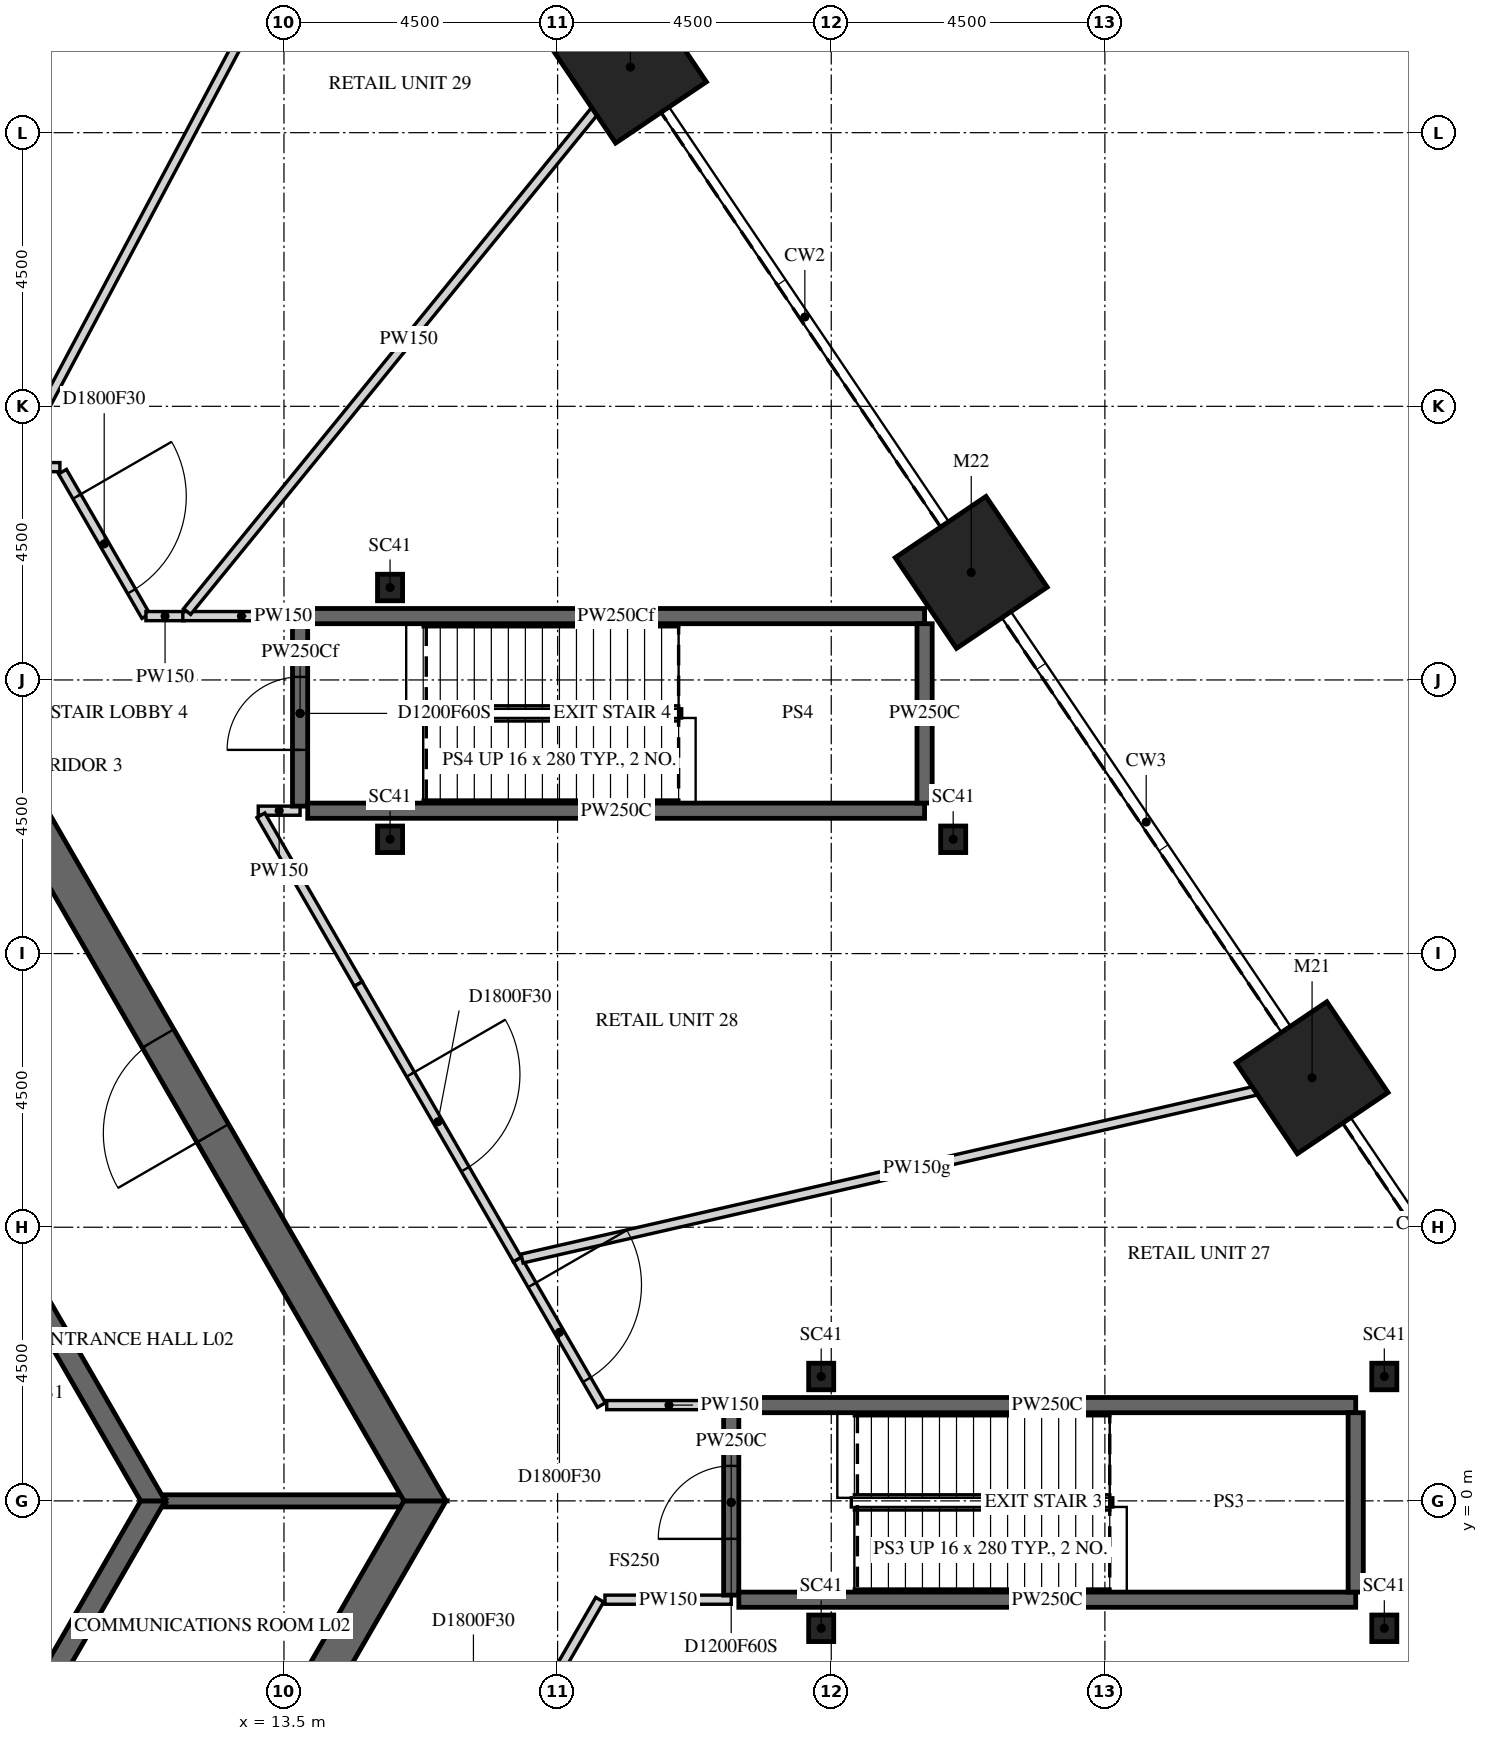
"""IFC4 building model, lengths in metres.
Left out: names, types, materials, properties, quantities, classifications, styles, units other than length and angle.
Written with IfcOpenShell. Run it as: python <this file> out.ifc"""

import sys

from ifc_helpers import new_model, si_unit, direction, frame, frame_2d, origin, origin_2d, place, context, subcontext, project, spatial, polyline, rectangle, i_section, outline, extrude, element, fill, save


model = new_model("IFC4")
c1 = context("Model", 3, precision=1e-05, world=origin(), true_north=direction((0.0, 1.0)))
c2 = subcontext(c1, "Body", "Model", "MODEL_VIEW")
j1 = project(units=[si_unit("LENGTHUNIT", "METRE"), si_unit("PLANEANGLEUNIT", "RADIAN")], contexts=[c1])
p1 = place(None, origin())
s1 = spatial("IfcSite", under=j1, at=p1, CompositionType="ELEMENT")
p2 = place(p1, origin())
s2 = spatial("IfcBuilding", under=s1, at=p2, CompositionType="ELEMENT")
p3 = place(p2, frame((0.0, 0.0, 15.0)))
s3 = spatial("IfcBuildingStorey", under=s2, at=p3, CompositionType="ELEMENT", Elevation=15.0)
for number, where, z_axis, x_axis in (
    (1, (30.407, 6.958, -0.25), (0.0, 0.0, 1.0), (0.559, -0.829, 0.0)),
    (2, (24.802, 15.269, -0.25), (0.0, 0.0, 1.0), (0.559, -0.829, 0.0)),
    (3, (19.197, 23.579, -0.25), (0.0, 0.0, 1.0), (0.559, -0.829, 0.0)),
):
    element("IfcColumn", number, at=place(p3, frame(where, z_axis=z_axis, x_axis=x_axis)), inside=s3, PredefinedType="COLUMN", context=c2, shape_type="SweptSolid", body=[
        extrude(rectangle(XDim=1.8, YDim=1.8, at=origin_2d()), origin(), (0.0, 0.0, 1.0), 5.5),
    ])
for number, where, z_axis, x_axis in (
    (4, (31.595, 2.045, -0.25), (0.0, 0.0, 1.0), (1.0, 0.0, 0.0)),
    (5, (31.595, -2.095, -0.25), (0.0, 0.0, 1.0), (1.0, 0.0, 0.0)),
    (6, (22.335, -2.095, -0.25), (0.0, 0.0, 1.0), (1.0, 0.0, 0.0)),
    (7, (22.335, 2.045, -0.25), (0.0, 0.0, 1.0), (1.0, 0.0, 0.0)),
    (8, (24.505, 10.88, -0.25), (0.0, 0.0, 1.0), (1.0, 0.0, 0.0)),
    (9, (15.245, 10.88, -0.25), (0.0, 0.0, 1.0), (1.0, 0.0, 0.0)),
    (10, (15.245, 15.02, -0.25), (0.0, 0.0, 1.0), (1.0, 0.0, 0.0)),
):
    element("IfcColumn", number, at=place(p3, frame(where, z_axis=z_axis, x_axis=x_axis)), inside=s3, PredefinedType="COLUMN", context=c2, shape_type="SweptSolid", body=[
        extrude(i_section(OverallWidth=0.412, OverallDepth=0.437, WebThickness=0.036, FlangeThickness=0.058, FilletRadius=0.015, at=origin_2d()), origin(), (0.0, 0.0, 1.0), 5.5),
    ])
p4 = place(p3, frame((7.91, -13.7, -0.25), z_axis=(0.0, 0.0, 1.0), x_axis=(0.499999880136, 0.866025472988, 0.0)))
e11 = element("IfcWall", 11, at=p4, inside=s3, PredefinedType="SHEAR", context=c2, shape_type="SweptSolid", body=[
    extrude(outline(polyline([(-0.173, -0.3), (15.993, -0.3), (15.646, 0.3), (0.173, 0.3), (-0.173, -0.3)])), origin(), (0.0, 0.0, 1.0), 5.5),
])
p5 = place(p4, frame((7.039, 0.0, 0.25)))
e12 = element("IfcOpeningElement", 12, at=p5, cuts=e11, PredefinedType="OPENING", context=c2, shape_type="SweptSolid", body=[
    extrude(rectangle(XDim=1.8, YDim=2.4, at=frame_2d((0.9, 1.2))), frame((0.0, 0.31, 0.0), z_axis=(0.0, -1.0, 0.0), x_axis=(1.0, 0.0, 0.0)), (0.0, 0.0, 1.0), 0.62),
])
p6 = place(p3, frame((15.819, 0.0, -0.25), z_axis=(0.0, 0.0, 1.0), x_axis=(-0.499999880136, 0.866025472988, 0.0)))
e13 = element("IfcWall", 13, at=p6, inside=s3, PredefinedType="SHEAR", context=c2, shape_type="SweptSolid", body=[
    extrude(outline(polyline([(-0.173, -0.3), (15.993, -0.3), (15.646, 0.3), (0.173, 0.3), (-0.173, -0.3)])), origin(), (0.0, 0.0, 1.0), 5.5),
])
p7 = place(p6, frame((6.981, 0.0, 0.25)))
e14 = element("IfcOpeningElement", 14, at=p7, cuts=e13, PredefinedType="OPENING", context=c2, shape_type="SweptSolid", body=[
    extrude(rectangle(XDim=1.8, YDim=2.4, at=frame_2d((0.9, 1.2))), frame((0.0, 0.31, 0.0), z_axis=(0.0, -1.0, 0.0), x_axis=(1.0, 0.0, 0.0)), (0.0, 0.0, 1.0), 0.62),
])
p8 = place(p3, frame((5.673, -9.825, -0.25), z_axis=(0.0, 0.0, 1.0), x_axis=(0.499995046907, 0.866028263435, 0.0)))
e15 = element("IfcWall", 15, at=p8, inside=s3, PredefinedType="SHEAR", context=c2, shape_type="SweptSolid", body=[
    extrude(outline(polyline([(-0.101, -0.175), (11.446, -0.175), (11.244, 0.175), (0.101, 0.175), (-0.101, -0.175)])), origin(), (0.0, 0.0, 1.0), 5.5),
])
p9 = place(p8, frame((4.801, 0.0, 0.25)))
e16 = element("IfcOpeningElement", 16, at=p9, cuts=e15, PredefinedType="OPENING", context=c2, shape_type="SweptSolid", body=[
    extrude(rectangle(XDim=1.8, YDim=2.4, at=frame_2d((0.9, 1.2))), frame((0.0, 0.185, 0.0), z_axis=(0.0, -1.0, 0.0), x_axis=(1.0, 0.0, 0.0)), (0.0, 0.0, 1.0), 0.37),
])
p10 = place(p3, frame((11.345, 0.0, -0.25), z_axis=(0.0, 0.0, 1.0), x_axis=(-0.499995046907, 0.866028263435, 0.0)))
e17 = element("IfcWall", 17, at=p10, inside=s3, PredefinedType="SHEAR", context=c2, shape_type="SweptSolid", body=[
    extrude(outline(polyline([(-0.101, -0.175), (11.446, -0.175), (11.244, 0.175), (0.101, 0.175), (-0.101, -0.175)])), origin(), (0.0, 0.0, 1.0), 5.5),
])
p11 = place(p10, frame((4.744, 0.0, 0.25)))
e18 = element("IfcOpeningElement", 18, at=p11, cuts=e17, PredefinedType="OPENING", context=c2, shape_type="SweptSolid", body=[
    extrude(rectangle(XDim=1.8, YDim=2.4, at=frame_2d((0.9, 1.2))), frame((0.0, 0.185, 0.0), z_axis=(0.0, -1.0, 0.0), x_axis=(1.0, 0.0, 0.0)), (0.0, 0.0, 1.0), 0.37),
])
p12 = place(p3, frame((11.547, 0.0, -0.25), z_axis=(0.0, 0.0, 1.0), x_axis=(1.0, 0.0, 0.0)))
e19 = element("IfcWall", 19, at=p12, inside=s3, PredefinedType="SHEAR", context=c2, shape_type="SweptSolid", body=[
    extrude(rectangle(XDim=3.926, YDim=0.2, at=frame_2d((1.963, 0.0))), origin(), (0.0, 0.0, 1.0), 5.5),
])
p13 = place(p3, frame((9.815, 17.0, 0.0), z_axis=(0.0, 0.0, 1.0), x_axis=(-1.0, 0.0, 0.0)))
e20 = element("IfcWall", 20, at=p13, inside=s3, PredefinedType="PARTITIONING", context=c2, shape_type="SweptSolid", body=[
    extrude(rectangle(XDim=0.776, YDim=0.15, at=frame_2d((0.388, 0.0))), origin(), (0.0, 0.0, 1.0), 5.25),
])
p14 = place(p3, frame((9.858, 16.925, 0.0), z_axis=(0.0, 0.0, 1.0), x_axis=(0.499835495421, -0.866120359718, 0.0)))
e21 = element("IfcWall", 21, at=p14, inside=s3, PredefinedType="PARTITIONING", context=c2, shape_type="SweptSolid", body=[
    extrude(rectangle(XDim=2.742, YDim=0.15, at=frame_2d((1.371, 0.0))), origin(), (0.0, 0.0, 1.0), 5.25),
])
p15 = place(p14, frame((0.471, 0.0, 0.0)))
e22 = element("IfcOpeningElement", 22, at=p15, cuts=e21, PredefinedType="OPENING", context=c2, shape_type="SweptSolid", body=[
    extrude(rectangle(XDim=1.8, YDim=2.1, at=frame_2d((0.9, 1.05))), frame((0.0, 0.085, 0.0), z_axis=(0.0, -1.0, 0.0), x_axis=(1.0, 0.0, 0.0)), (0.0, 0.0, 1.0), 0.17),
])
p16 = place(p3, frame((11.23, 14.55, 0.0), z_axis=(0.0, 0.0, 1.0), x_axis=(1.0, 0.0, 0.0)))
e23 = element("IfcWall", 23, at=p16, inside=s3, PredefinedType="PARTITIONING", context=c2, shape_type="SweptSolid", body=[
    extrude(rectangle(XDim=0.629, YDim=0.15, at=frame_2d((0.314, 0.0))), origin(), (0.0, 0.0, 1.0), 5.25),
])
p17 = place(p3, frame((11.836, 14.55, 0.0), z_axis=(0.0, 0.0, 1.0), x_axis=(1.0, 0.0, 0.0)))
e24 = element("IfcWall", 24, at=p17, inside=s3, PredefinedType="PARTITIONING", context=c2, shape_type="SweptSolid", body=[
    extrude(rectangle(XDim=1.929, YDim=0.15, at=frame_2d((0.964, 0.0))), origin(), (0.0, 0.0, 1.0), 5.25),
])
p18 = place(p3, frame((13.765, 11.35, 0.0), z_axis=(0.0, 0.0, 1.0), x_axis=(-1.0, 0.0, 0.0)))
e25 = element("IfcWall", 25, at=p18, inside=s3, PredefinedType="PARTITIONING", context=c2, shape_type="SweptSolid", body=[
    extrude(rectangle(XDim=0.688, YDim=0.15, at=frame_2d((0.344, 0.0))), origin(), (0.0, 0.0, 1.0), 5.25),
])
p19 = place(p3, frame((13.765, 11.425, 0.0), z_axis=(0.0, 0.0, 1.0), x_axis=(0.0, 1.0, 0.0)))
e26 = element("IfcWall", 26, at=p19, inside=s3, PredefinedType="PARTITIONING", context=c2, shape_type="SweptSolid", body=[
    extrude(rectangle(XDim=3.05, YDim=0.25, at=frame_2d((1.525, 0.0))), origin(), (0.0, 0.0, 1.0), 4.496),
])
p20 = place(p19, frame((0.925, 0.0, 0.0)))
e27 = element("IfcOpeningElement", 27, at=p20, cuts=e26, PredefinedType="OPENING", context=c2, shape_type="SweptSolid", body=[
    extrude(rectangle(XDim=1.2, YDim=2.1, at=frame_2d((0.6, 1.05))), frame((0.0, 0.135, 0.0), z_axis=(0.0, -1.0, 0.0), x_axis=(1.0, 0.0, 0.0)), (0.0, 0.0, 1.0), 0.27),
])
p21 = place(p3, frame((13.89, 14.55, 0.0), z_axis=(0.0, 0.0, 1.0), x_axis=(1.0, 0.0, 0.0)))
e28 = element("IfcWall", 28, at=p21, inside=s3, PredefinedType="PARTITIONING", context=c2, shape_type="SweptSolid", body=[
    extrude(rectangle(XDim=10.145, YDim=0.25, at=frame_2d((5.073, 0.0))), origin(), (0.0, 0.0, 1.0), 4.496),
])
p22 = place(p3, frame((14.723, 8.5, 0.0), z_axis=(0.0, 0.0, 1.0), x_axis=(-0.500104956678, 0.865964798538, 0.0)))
e29 = element("IfcWall", 29, at=p22, inside=s3, PredefinedType="PARTITIONING", context=c2, shape_type="SweptSolid", body=[
    extrude(rectangle(XDim=3.204, YDim=0.15, at=frame_2d((1.602, 0.0))), origin(), (0.0, 0.0, 1.0), 5.25),
])
p23 = place(p3, frame((15.261, 28.701, 0.0), z_axis=(0.0, 0.0, 1.0), x_axis=(-0.469500426527, -0.882932245131, 0.0)))
e30 = element("IfcWall", 30, at=p23, inside=s3, PredefinedType="PARTITIONING", context=c2, shape_type="SweptSolid", body=[
    extrude(rectangle(XDim=13.167, YDim=0.15, at=frame_2d((6.584, 0.0))), origin(), (0.0, 0.0, 1.0), 4.488),
])
p24 = place(p3, frame((14.723, 8.5, 0.0), z_axis=(0.0, 0.0, 1.0), x_axis=(0.499952654668, -0.866052736899, 0.0)))
e31 = element("IfcWall", 31, at=p24, inside=s3, PredefinedType="PARTITIONING", context=c2, shape_type="SweptSolid", body=[
    extrude(rectangle(XDim=5.233, YDim=0.15, at=frame_2d((2.616, 0.0))), origin(), (0.0, 0.0, 1.0), 5.25),
])
p25 = place(p24, frame((1.716, 0.0, 0.0)))
e32 = element("IfcOpeningElement", 32, at=p25, cuts=e31, PredefinedType="OPENING", context=c2, shape_type="SweptSolid", body=[
    extrude(rectangle(XDim=1.8, YDim=2.1, at=frame_2d((0.9, 1.05))), frame((0.0, 0.085, 0.0), z_axis=(0.0, -1.0, 0.0), x_axis=(1.0, 0.0, 0.0)), (0.0, 0.0, 1.0), 0.17),
])
p26 = place(p3, frame((18.004, -2.816, 0.0), z_axis=(0.0, 0.0, 1.0), x_axis=(0.500224363519, 0.865895828689, 0.0)))
e33 = element("IfcWall", 33, at=p26, inside=s3, PredefinedType="PARTITIONING", context=c2, shape_type="SweptSolid", body=[
    extrude(rectangle(XDim=1.375, YDim=0.15, at=frame_2d((0.688, 0.0))), origin(), (0.0, 0.0, 1.0), 5.25),
])
p27 = place(p3, frame((17.339, 3.968, 0.0), z_axis=(0.0, 0.0, 1.0), x_axis=(0.500053847239, -0.865994312834, 0.0)))
e34 = element("IfcWall", 34, at=p27, inside=s3, PredefinedType="PARTITIONING", context=c2, shape_type="SweptSolid", body=[
    extrude(rectangle(XDim=2.763, YDim=0.15, at=frame_2d((1.382, 0.0))), origin(), (0.0, 0.0, 1.0), 5.25),
])
p28 = place(p27, frame((0.482, 0.0, 0.0)))
e35 = element("IfcOpeningElement", 35, at=p28, cuts=e34, PredefinedType="OPENING", context=c2, shape_type="SweptSolid", body=[
    extrude(rectangle(XDim=1.8, YDim=2.1, at=frame_2d((0.9, 1.05))), frame((0.0, 0.085, 0.0), z_axis=(0.0, -1.0, 0.0), x_axis=(1.0, 0.0, 0.0)), (0.0, 0.0, 1.0), 0.17),
])
p29 = place(p3, frame((18.808, 1.575, 0.0), z_axis=(0.0, 0.0, 1.0), x_axis=(1.0, 0.0, 0.0)))
e36 = element("IfcWall", 36, at=p29, inside=s3, PredefinedType="PARTITIONING", context=c2, shape_type="SweptSolid", body=[
    extrude(rectangle(XDim=2.047, YDim=0.15, at=frame_2d((1.024, 0.0))), origin(), (0.0, 0.0, 1.0), 5.25),
])
p30 = place(p3, frame((19.197, 23.578, 0.0), z_axis=(0.0, 0.0, 1.0), x_axis=(-0.631417805909, -0.775442811805, 0.0)))
e37 = element("IfcWall", 37, at=p30, inside=s3, PredefinedType="PARTITIONING", context=c2, shape_type="SweptSolid", body=[
    extrude(rectangle(XDim=11.545, YDim=0.15, at=frame_2d((5.773, 0.0))), origin(), (0.0, 0.0, 1.0), 5.25),
])
p31 = place(p3, frame((20.855, -1.625, 0.0), z_axis=(0.0, 0.0, 1.0), x_axis=(-1.0, 0.0, 0.0)))
e38 = element("IfcWall", 38, at=p31, inside=s3, PredefinedType="PARTITIONING", context=c2, shape_type="SweptSolid", body=[
    extrude(rectangle(XDim=2.076, YDim=0.15, at=frame_2d((1.038, 0.0))), origin(), (0.0, 0.0, 1.0), 5.25),
])
p32 = place(p3, frame((20.855, -1.55, 0.0), z_axis=(0.0, 0.0, 1.0), x_axis=(0.0, 1.0, 0.0)))
e39 = element("IfcWall", 39, at=p32, inside=s3, PredefinedType="PARTITIONING", context=c2, shape_type="SweptSolid", body=[
    extrude(rectangle(XDim=3.05, YDim=0.25, at=frame_2d((1.525, 0.0))), origin(), (0.0, 0.0, 1.0), 5.25),
])
p33 = place(p32, frame((0.925, 0.0, 0.0)))
e40 = element("IfcOpeningElement", 40, at=p33, cuts=e39, PredefinedType="OPENING", context=c2, shape_type="SweptSolid", body=[
    extrude(rectangle(XDim=1.2, YDim=2.1, at=frame_2d((0.6, 1.05))), frame((0.0, 0.135, 0.0), z_axis=(0.0, -1.0, 0.0), x_axis=(1.0, 0.0, 0.0)), (0.0, 0.0, 1.0), 0.27),
])
for number, where, z_axis, x_axis in (
    (41, (20.98, 1.575, 0.0), (0.0, 0.0, 1.0), (1.0, 0.0, 0.0)),
    (42, (24.035, 11.35, 0.0), (0.0, 0.0, 1.0), (-1.0, 0.0, 0.0)),
):
    element("IfcWall", number, at=place(p3, frame(where, z_axis=z_axis, x_axis=x_axis)), inside=s3, PredefinedType="PARTITIONING", context=c2, shape_type="SweptSolid", body=[
        extrude(rectangle(XDim=10.145, YDim=0.25, at=frame_2d((5.073, 0.0))), origin(), (0.0, 0.0, 1.0), 5.25),
    ])
p34 = place(p3, frame((24.035, 14.425, 0.0), z_axis=(0.0, 0.0, 1.0), x_axis=(0.0, -1.0, 0.0)))
e43 = element("IfcWall", 43, at=p34, inside=s3, PredefinedType="PARTITIONING", context=c2, shape_type="SweptSolid", body=[
    extrude(rectangle(XDim=2.95, YDim=0.25, at=frame_2d((1.475, 0.0))), origin(), (0.0, 0.0, 1.0), 5.25),
])
p35 = place(p3, frame((30.407, 6.958, 0.0), z_axis=(0.0, 0.0, 1.0), x_axis=(-0.974810618682, -0.223034207477, 0.0)))
e44 = element("IfcWall", 44, at=p35, inside=s3, PredefinedType="PARTITIONING", context=c2, shape_type="SweptSolid", body=[
    extrude(rectangle(XDim=13.327, YDim=0.15, at=frame_2d((6.664, 0.0))), origin(), (0.0, 0.0, 1.0), 4.488),
])
p36 = place(p3, frame((31.125, -1.625, 0.0), z_axis=(0.0, 0.0, 1.0), x_axis=(-1.0, 0.0, 0.0)))
e45 = element("IfcWall", 45, at=p36, inside=s3, PredefinedType="PARTITIONING", context=c2, shape_type="SweptSolid", body=[
    extrude(rectangle(XDim=10.145, YDim=0.25, at=frame_2d((5.073, 0.0))), origin(), (0.0, 0.0, 1.0), 5.25),
])
p37 = place(p3, frame((31.125, 1.45, 0.0), z_axis=(0.0, 0.0, 1.0), x_axis=(0.0, -1.0, 0.0)))
e46 = element("IfcWall", 46, at=p37, inside=s3, PredefinedType="PARTITIONING", context=c2, shape_type="SweptSolid", body=[
    extrude(rectangle(XDim=2.95, YDim=0.25, at=frame_2d((1.475, 0.0))), origin(), (0.0, 0.0, 1.0), 5.25),
])
p38 = place(p7, origin())
e47 = element("IfcDoor", 47, at=p38, inside=s3, OperationType="DOUBLE_DOOR_SINGLE_SWING", PredefinedType="DOOR", context=c2, shape_type="SweptSolid", body=[
    extrude(rectangle(XDim=1.8, YDim=2.4, at=frame_2d((0.9, 1.2))), frame((0.0, 0.025, 0.0), z_axis=(0.0, -1.0, 0.0), x_axis=(1.0, 0.0, 0.0)), (0.0, 0.0, 1.0), 0.05),
])
fill(e14, e47)
p39 = place(p15, origin())
e48 = element("IfcDoor", 48, at=p39, inside=s3, OperationType="DOUBLE_DOOR_SINGLE_SWING", PredefinedType="DOOR", context=c2, shape_type="SweptSolid", body=[
    extrude(rectangle(XDim=1.8, YDim=2.1, at=frame_2d((0.9, 1.05))), frame((0.0, 0.025, 0.0), z_axis=(0.0, -1.0, 0.0), x_axis=(1.0, 0.0, 0.0)), (0.0, 0.0, 1.0), 0.05),
])
fill(e22, e48)
p40 = place(p20, origin())
e49 = element("IfcDoor", 49, at=p40, inside=s3, OperationType="SINGLE_SWING_LEFT", PredefinedType="DOOR", context=c2, shape_type="SweptSolid", body=[
    extrude(rectangle(XDim=1.2, YDim=2.1, at=frame_2d((0.6, 1.05))), frame((0.0, 0.025, 0.0), z_axis=(0.0, -1.0, 0.0), x_axis=(1.0, 0.0, 0.0)), (0.0, 0.0, 1.0), 0.05),
])
fill(e27, e49)
p41 = place(p25, origin())
e50 = element("IfcDoor", 50, at=p41, inside=s3, OperationType="DOUBLE_DOOR_SINGLE_SWING", PredefinedType="DOOR", context=c2, shape_type="SweptSolid", body=[
    extrude(rectangle(XDim=1.8, YDim=2.1, at=frame_2d((0.9, 1.05))), frame((0.0, 0.025, 0.0), z_axis=(0.0, -1.0, 0.0), x_axis=(1.0, 0.0, 0.0)), (0.0, 0.0, 1.0), 0.05),
])
fill(e32, e50)
p42 = place(p28, origin())
e51 = element("IfcDoor", 51, at=p42, inside=s3, OperationType="DOUBLE_DOOR_SINGLE_SWING", PredefinedType="DOOR", context=c2, shape_type="SweptSolid", body=[
    extrude(rectangle(XDim=1.8, YDim=2.1, at=frame_2d((0.9, 1.05))), frame((0.0, 0.025, 0.0), z_axis=(0.0, -1.0, 0.0), x_axis=(1.0, 0.0, 0.0)), (0.0, 0.0, 1.0), 0.05),
])
fill(e35, e51)
p43 = place(p33, origin())
e52 = element("IfcDoor", 52, at=p43, inside=s3, OperationType="SINGLE_SWING_LEFT", PredefinedType="DOOR", context=c2, shape_type="SweptSolid", body=[
    extrude(rectangle(XDim=1.2, YDim=2.1, at=frame_2d((0.6, 1.05))), frame((0.0, 0.025, 0.0), z_axis=(0.0, -1.0, 0.0), x_axis=(1.0, 0.0, 0.0)), (0.0, 0.0, 1.0), 0.05),
])
fill(e40, e52)
save(model, sys.argv[1])
